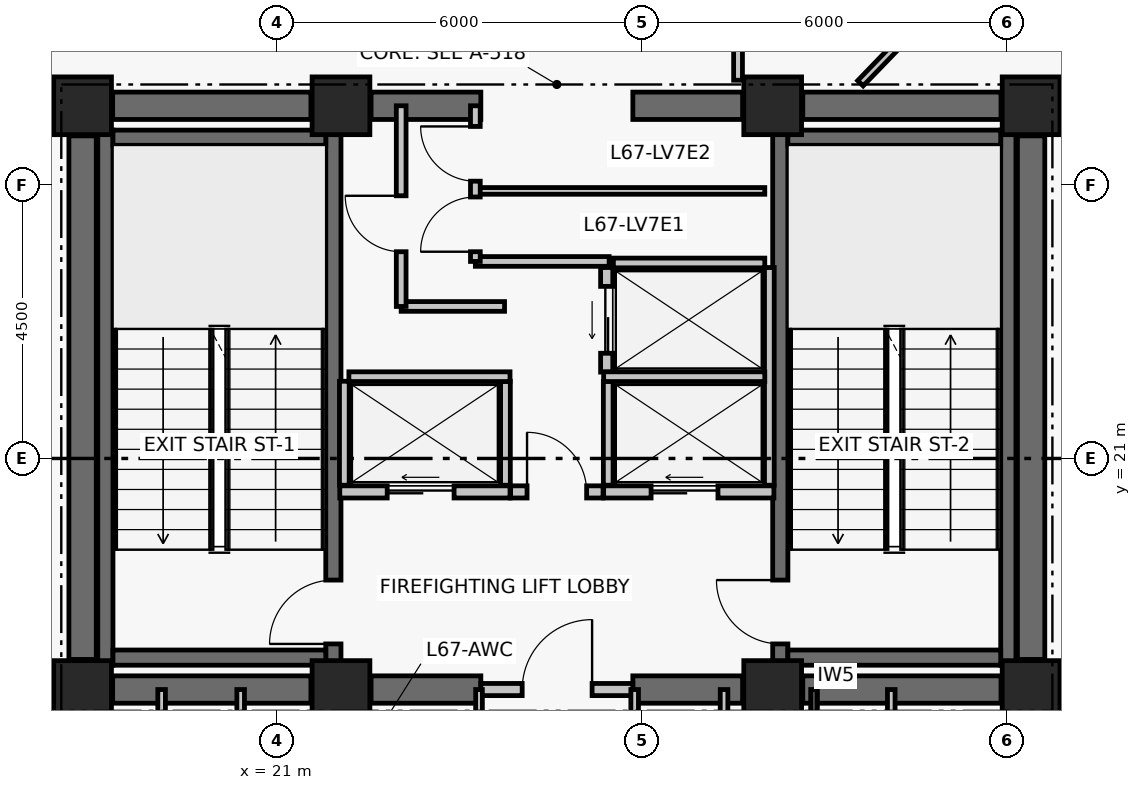
"""IFC4 building model, lengths in metres.
Left out: names, types, materials, properties, quantities, classifications, styles, units other than length and angle.
Written with IfcOpenShell. Run it as: python <this file> out.ifc"""

import sys

from ifc_helpers import new_model, si_unit, direction, frame, frame_2d, origin, origin_2d, place, context, subcontext, project, spatial, rectangle, extrude, element, fill, save


model = new_model("IFC4")
c1 = context("Model", 3, precision=1e-05, world=origin(), true_north=direction((0.0, 1.0)))
c2 = subcontext(c1, "Body", "Model", "MODEL_VIEW")
j1 = project(units=[si_unit("LENGTHUNIT", "METRE"), si_unit("PLANEANGLEUNIT", "RADIAN")], contexts=[c1])
p1 = place(None, origin())
s1 = spatial("IfcSite", under=j1, at=p1, CompositionType="ELEMENT")
p2 = place(p1, origin())
s2 = spatial("IfcBuilding", under=s1, at=p2, CompositionType="ELEMENT")
p3 = place(p2, frame((0.0, 0.0, 265.74)))
s3 = spatial("IfcBuildingStorey", under=s2, at=p3, CompositionType="ELEMENT", Elevation=265.74)
for number, where, z_axis, x_axis in (
    (1, (17.8, 17.2, 0.0), (0.0, 0.0, 1.0), (1.0, 0.0, 0.0)),
    (2, (22.05, 17.2, 0.0), (0.0, 0.0, 1.0), (1.0, 0.0, 0.0)),
    (3, (29.15, 17.2, 0.0), (0.0, 0.0, 1.0), (1.0, 0.0, 0.0)),
    (4, (33.4, 17.2, 0.0), (0.0, 0.0, 1.0), (1.0, 0.0, 0.0)),
    (5, (17.8, 26.8, 0.0), (0.0, 0.0, 1.0), (1.0, 0.0, 0.0)),
    (6, (22.05, 26.8, 0.0), (0.0, 0.0, 1.0), (1.0, 0.0, 0.0)),
    (7, (29.15, 26.8, 0.0), (0.0, 0.0, 1.0), (1.0, 0.0, 0.0)),
    (8, (33.4, 26.8, 0.0), (0.0, 0.0, 1.0), (1.0, 0.0, 0.0)),
):
    element("IfcColumn", number, at=place(p3, frame(where, z_axis=z_axis, x_axis=x_axis)), inside=s3, PredefinedType="COLUMN", context=c2, shape_type="SweptSolid", body=[
        extrude(rectangle(XDim=0.95, YDim=0.95, at=origin_2d()), origin(), (0.0, 0.0, 1.0), 3.72),
    ])
p4 = place(p3, frame((18.295, 17.2, 0.0), z_axis=(0.0, 0.0, 1.0), x_axis=(1.0, 0.0, 0.0)))
e9 = element("IfcWall", 9, at=p4, inside=s3, PredefinedType="SHEAR", context=c2, shape_type="SweptSolid", body=[
    extrude(rectangle(XDim=3.26, YDim=0.45, at=frame_2d((1.63, 0.0))), origin(), (0.0, 0.0, 1.0), 3.5),
])
p5 = place(p3, frame((22.545, 17.2, 0.0), z_axis=(0.0, 0.0, 1.0), x_axis=(1.0, 0.0, 0.0)))
e10 = element("IfcWall", 10, at=p5, inside=s3, PredefinedType="SHEAR", context=c2, shape_type="SweptSolid", body=[
    extrude(rectangle(XDim=1.805, YDim=0.45, at=frame_2d((0.903, 0.0))), origin(), (0.0, 0.0, 1.0), 3.5),
])
p6 = place(p3, frame((26.85, 17.2, 0.0), z_axis=(0.0, 0.0, 1.0), x_axis=(1.0, 0.0, 0.0)))
e11 = element("IfcWall", 11, at=p6, inside=s3, PredefinedType="SHEAR", context=c2, shape_type="SweptSolid", body=[
    extrude(rectangle(XDim=1.805, YDim=0.45, at=frame_2d((0.902, 0.0))), origin(), (0.0, 0.0, 1.0), 3.5),
])
for number, where, z_axis, x_axis in (
    (12, (29.645, 17.2, 0.0), (0.0, 0.0, 1.0), (1.0, 0.0, 0.0)),
    (13, (18.295, 26.8, 0.0), (0.0, 0.0, 1.0), (1.0, 0.0, 0.0)),
):
    element("IfcWall", number, at=place(p3, frame(where, z_axis=z_axis, x_axis=x_axis)), inside=s3, PredefinedType="SHEAR", context=c2, shape_type="SweptSolid", body=[
        extrude(rectangle(XDim=3.26, YDim=0.45, at=frame_2d((1.63, 0.0))), origin(), (0.0, 0.0, 1.0), 3.5),
    ])
p7 = place(p3, frame((22.545, 26.8, 0.0), z_axis=(0.0, 0.0, 1.0), x_axis=(1.0, 0.0, 0.0)))
e14 = element("IfcWall", 14, at=p7, inside=s3, PredefinedType="SHEAR", context=c2, shape_type="SweptSolid", body=[
    extrude(rectangle(XDim=1.805, YDim=0.45, at=frame_2d((0.903, 0.0))), origin(), (0.0, 0.0, 1.0), 3.5),
])
p8 = place(p3, frame((26.85, 26.8, 0.0), z_axis=(0.0, 0.0, 1.0), x_axis=(1.0, 0.0, 0.0)))
e15 = element("IfcWall", 15, at=p8, inside=s3, PredefinedType="SHEAR", context=c2, shape_type="SweptSolid", body=[
    extrude(rectangle(XDim=1.805, YDim=0.45, at=frame_2d((0.902, 0.0))), origin(), (0.0, 0.0, 1.0), 3.5),
])
p9 = place(p3, frame((29.645, 26.8, 0.0), z_axis=(0.0, 0.0, 1.0), x_axis=(1.0, 0.0, 0.0)))
e16 = element("IfcWall", 16, at=p9, inside=s3, PredefinedType="SHEAR", context=c2, shape_type="SweptSolid", body=[
    extrude(rectangle(XDim=3.26, YDim=0.45, at=frame_2d((1.63, 0.0))), origin(), (0.0, 0.0, 1.0), 3.5),
])
for number, where, z_axis, x_axis in (
    (17, (17.8, 17.695, 0.0), (0.0, 0.0, 1.0), (0.0, 1.0, 0.0)),
    (18, (33.4, 17.695, 0.0), (0.0, 0.0, 1.0), (0.0, 1.0, 0.0)),
):
    element("IfcWall", number, at=place(p3, frame(where, z_axis=z_axis, x_axis=x_axis)), inside=s3, PredefinedType="SHEAR", context=c2, shape_type="SweptSolid", body=[
        extrude(rectangle(XDim=8.61, YDim=0.45, at=frame_2d((4.305, 0.0))), origin(), (0.0, 0.0, 1.0), 3.5),
    ])
p10 = place(p3, frame((18.175, 17.6, 0.0), z_axis=(0.0, 0.0, 1.0), x_axis=(0.0, 1.0, 0.0)))
e19 = element("IfcWall", 19, at=p10, inside=s3, PredefinedType="SHEAR", context=c2, shape_type="SweptSolid", body=[
    extrude(rectangle(XDim=8.8, YDim=0.25, at=frame_2d((4.4, 0.0))), origin(), (0.0, 0.0, 1.0), 3.5),
])
p11 = place(p3, frame((21.925, 17.6, 0.0), z_axis=(0.0, 0.0, 1.0), x_axis=(0.0, 1.0, 0.0)))
e20 = element("IfcWall", 20, at=p11, inside=s3, PredefinedType="SHEAR", context=c2, shape_type="SweptSolid", body=[
    extrude(rectangle(XDim=8.8, YDim=0.25, at=frame_2d((4.4, 0.0))), origin(), (0.0, 0.0, 1.0), 3.5),
])
p12 = place(p11, frame((0.35, 0.0, 0.0)))
e21 = element("IfcOpeningElement", 21, at=p12, cuts=e20, PredefinedType="OPENING", context=c2, shape_type="SweptSolid", body=[
    extrude(rectangle(XDim=1.05, YDim=2.08, at=frame_2d((0.525, 1.04))), frame((0.0, 0.135, 0.0), z_axis=(0.0, -1.0, 0.0), x_axis=(1.0, 0.0, 0.0)), (0.0, 0.0, 1.0), 0.27),
])
for number, where, z_axis, x_axis in (
    (22, (18.3, 17.725, 0.0), (0.0, 0.0, 1.0), (1.0, 0.0, 0.0)),
    (23, (18.3, 26.275, 0.0), (0.0, 0.0, 1.0), (1.0, 0.0, 0.0)),
):
    element("IfcWall", number, at=place(p3, frame(where, z_axis=z_axis, x_axis=x_axis)), inside=s3, PredefinedType="SHEAR", context=c2, shape_type="SweptSolid", body=[
        extrude(rectangle(XDim=3.5, YDim=0.25, at=frame_2d((1.75, 0.0))), origin(), (0.0, 0.0, 1.0), 3.5),
    ])
p13 = place(p3, frame((29.275, 17.6, 0.0), z_axis=(0.0, 0.0, 1.0), x_axis=(0.0, 1.0, 0.0)))
e24 = element("IfcWall", 24, at=p13, inside=s3, PredefinedType="SHEAR", context=c2, shape_type="SweptSolid", body=[
    extrude(rectangle(XDim=8.8, YDim=0.25, at=frame_2d((4.4, 0.0))), origin(), (0.0, 0.0, 1.0), 3.5),
])
p14 = place(p13, frame((0.35, 0.0, 0.0)))
e25 = element("IfcOpeningElement", 25, at=p14, cuts=e24, PredefinedType="OPENING", context=c2, shape_type="SweptSolid", body=[
    extrude(rectangle(XDim=1.05, YDim=2.08, at=frame_2d((0.525, 1.04))), frame((0.0, 0.135, 0.0), z_axis=(0.0, -1.0, 0.0), x_axis=(1.0, 0.0, 0.0)), (0.0, 0.0, 1.0), 0.27),
])
p15 = place(p3, frame((33.025, 17.6, 0.0), z_axis=(0.0, 0.0, 1.0), x_axis=(0.0, 1.0, 0.0)))
e26 = element("IfcWall", 26, at=p15, inside=s3, PredefinedType="SHEAR", context=c2, shape_type="SweptSolid", body=[
    extrude(rectangle(XDim=8.8, YDim=0.25, at=frame_2d((4.4, 0.0))), origin(), (0.0, 0.0, 1.0), 3.5),
])
for number, where, z_axis, x_axis in (
    (27, (29.4, 17.725, 0.0), (0.0, 0.0, 1.0), (1.0, 0.0, 0.0)),
    (28, (29.4, 26.275, 0.0), (0.0, 0.0, 1.0), (1.0, 0.0, 0.0)),
):
    element("IfcWall", number, at=place(p3, frame(where, z_axis=z_axis, x_axis=x_axis)), inside=s3, PredefinedType="SHEAR", context=c2, shape_type="SweptSolid", body=[
        extrude(rectangle(XDim=3.5, YDim=0.25, at=frame_2d((1.75, 0.0))), origin(), (0.0, 0.0, 1.0), 3.5),
    ])
p16 = place(p3, frame((24.35, 17.2, 0.0), z_axis=(0.0, 0.0, 1.0), x_axis=(1.0, 0.0, 0.0)))
e29 = element("IfcWall", 29, at=p16, inside=s3, PredefinedType="PARTITIONING", context=c2, shape_type="SweptSolid", body=[
    extrude(rectangle(XDim=2.5, YDim=0.2, at=frame_2d((1.25, 0.0))), origin(), (0.0, 0.0, 1.0), 2.63),
])
p17 = place(p16, frame((0.68, 0.0, 0.0)))
e30 = element("IfcOpeningElement", 30, at=p17, cuts=e29, PredefinedType="OPENING", context=c2, shape_type="SweptSolid", body=[
    extrude(rectangle(XDim=1.15, YDim=2.08, at=frame_2d((0.575, 1.04))), frame((0.0, 0.11, 0.0), z_axis=(0.0, -1.0, 0.0), x_axis=(1.0, 0.0, 0.0)), (0.0, 0.0, 1.0), 0.22),
])
p18 = place(p3, frame((24.84, 20.45, 0.0), z_axis=(0.0, 0.0, 1.0), x_axis=(1.0, 0.0, 0.0)))
e31 = element("IfcWall", 31, at=p18, inside=s3, PredefinedType="PARTITIONING", context=c2, shape_type="SweptSolid", body=[
    extrude(rectangle(XDim=1.52, YDim=0.2, at=frame_2d((0.76, 0.0))), origin(), (0.0, 0.0, 1.0), 3.5),
])
p19 = place(p18, frame((0.27, 0.0, 0.0)))
e32 = element("IfcOpeningElement", 32, at=p19, cuts=e31, PredefinedType="OPENING", context=c2, shape_type="SweptSolid", body=[
    extrude(rectangle(XDim=0.98, YDim=2.06, at=frame_2d((0.49, 1.03))), frame((0.0, 0.11, 0.0), z_axis=(0.0, -1.0, 0.0), x_axis=(1.0, 0.0, 0.0)), (0.0, 0.0, 1.0), 0.22),
])
p20 = place(p3, frame((22.03, 20.45, 0.0), z_axis=(0.0, 0.0, 1.0), x_axis=(1.0, 0.0, 0.0)))
e33 = element("IfcWall", 33, at=p20, inside=s3, PredefinedType="PARTITIONING", context=c2, shape_type="SweptSolid", body=[
    extrude(rectangle(XDim=2.8, YDim=0.2, at=frame_2d((1.4, 0.0))), origin(), (0.0, 0.0, 1.0), 3.5),
])
p21 = place(p20, frame((0.78, 0.0, 0.0)))
e34 = element("IfcOpeningElement", 34, at=p21, cuts=e33, PredefinedType="OPENING", context=c2, shape_type="SweptSolid", body=[
    extrude(rectangle(XDim=1.1, YDim=2.08, at=frame_2d((0.55, 1.04))), frame((0.0, 0.11, 0.0), z_axis=(0.0, -1.0, 0.0), x_axis=(1.0, 0.0, 0.0)), (0.0, 0.0, 1.0), 0.22),
])
p22 = place(p3, frame((26.37, 20.45, 0.0), z_axis=(0.0, 0.0, 1.0), x_axis=(1.0, 0.0, 0.0)))
e35 = element("IfcWall", 35, at=p22, inside=s3, PredefinedType="PARTITIONING", context=c2, shape_type="SweptSolid", body=[
    extrude(rectangle(XDim=2.8, YDim=0.2, at=frame_2d((1.4, 0.0))), origin(), (0.0, 0.0, 1.0), 3.5),
])
p23 = place(p22, frame((0.78, 0.0, 0.0)))
e36 = element("IfcOpeningElement", 36, at=p23, cuts=e35, PredefinedType="OPENING", context=c2, shape_type="SweptSolid", body=[
    extrude(rectangle(XDim=1.1, YDim=2.08, at=frame_2d((0.55, 1.04))), frame((0.0, 0.11, 0.0), z_axis=(0.0, -1.0, 0.0), x_axis=(1.0, 0.0, 0.0)), (0.0, 0.0, 1.0), 0.22),
])
p24 = place(p3, frame((26.42, 22.42, 0.0), z_axis=(0.0, 0.0, 1.0), x_axis=(0.0, 1.0, 0.0)))
e37 = element("IfcWall", 37, at=p24, inside=s3, PredefinedType="PARTITIONING", context=c2, shape_type="SweptSolid", body=[
    extrude(rectangle(XDim=1.72, YDim=0.2, at=frame_2d((0.86, 0.0))), origin(), (0.0, 0.0, 1.0), 3.5),
])
p25 = place(p24, frame((0.31, 0.0, 0.0)))
e38 = element("IfcOpeningElement", 38, at=p25, cuts=e37, PredefinedType="OPENING", context=c2, shape_type="SweptSolid", body=[
    extrude(rectangle(XDim=1.1, YDim=2.08, at=frame_2d((0.55, 1.04))), frame((0.0, 0.11, 0.0), z_axis=(0.0, -1.0, 0.0), x_axis=(1.0, 0.0, 0.0)), (0.0, 0.0, 1.0), 0.22),
])
for number, where, z_axis, x_axis in (
    (39, (22.105, 20.56, 0.0), (0.0, 0.0, 1.0), (0.0, 1.0, 0.0)),
    (40, (24.755, 20.56, 0.0), (0.0, 0.0, 1.0), (0.0, 1.0, 0.0)),
):
    element("IfcWall", number, at=place(p3, frame(where, z_axis=z_axis, x_axis=x_axis)), inside=s3, PredefinedType="PARTITIONING", context=c2, shape_type="SweptSolid", body=[
        extrude(rectangle(XDim=1.71, YDim=0.16, at=frame_2d((0.855, 0.0))), origin(), (0.0, 0.0, 1.0), 3.5),
    ])
p26 = place(p3, frame((22.18, 22.345, 0.0), z_axis=(0.0, 0.0, 1.0), x_axis=(1.0, 0.0, 0.0)))
e41 = element("IfcWall", 41, at=p26, inside=s3, PredefinedType="PARTITIONING", context=c2, shape_type="SweptSolid", body=[
    extrude(rectangle(XDim=2.65, YDim=0.16, at=frame_2d((1.325, 0.0))), origin(), (0.0, 0.0, 1.0), 3.5),
])
p27 = place(p3, frame((29.095, 20.56, 0.0), z_axis=(0.0, 0.0, 1.0), x_axis=(0.0, 1.0, 0.0)))
e42 = element("IfcWall", 42, at=p27, inside=s3, PredefinedType="PARTITIONING", context=c2, shape_type="SweptSolid", body=[
    extrude(rectangle(XDim=3.58, YDim=0.16, at=frame_2d((1.79, 0.0))), origin(), (0.0, 0.0, 1.0), 3.5),
])
p28 = place(p3, frame((26.445, 20.56, 0.0), z_axis=(0.0, 0.0, 1.0), x_axis=(0.0, 1.0, 0.0)))
e43 = element("IfcWall", 43, at=p28, inside=s3, PredefinedType="PARTITIONING", context=c2, shape_type="SweptSolid", body=[
    extrude(rectangle(XDim=1.71, YDim=0.16, at=frame_2d((0.855, 0.0))), origin(), (0.0, 0.0, 1.0), 3.5),
])
p29 = place(p3, frame((26.37, 22.345, 0.0), z_axis=(0.0, 0.0, 1.0), x_axis=(1.0, 0.0, 0.0)))
e44 = element("IfcWall", 44, at=p29, inside=s3, PredefinedType="PARTITIONING", context=c2, shape_type="SweptSolid", body=[
    extrude(rectangle(XDim=2.65, YDim=0.16, at=frame_2d((1.325, 0.0))), origin(), (0.0, 0.0, 1.0), 3.5),
])
p30 = place(p3, frame((26.53, 24.215, 0.0), z_axis=(0.0, 0.0, 1.0), x_axis=(1.0, 0.0, 0.0)))
e45 = element("IfcWall", 45, at=p30, inside=s3, PredefinedType="PARTITIONING", context=c2, shape_type="SweptSolid", body=[
    extrude(rectangle(XDim=2.49, YDim=0.16, at=frame_2d((1.245, 0.0))), origin(), (0.0, 0.0, 1.0), 3.5),
])
p31 = place(p3, frame((23.04, 23.5, 0.0), z_axis=(0.0, 0.0, 1.0), x_axis=(1.0, 0.0, 0.0)))
e46 = element("IfcWall", 46, at=p31, inside=s3, PredefinedType="PARTITIONING", context=c2, shape_type="SweptSolid", body=[
    extrude(rectangle(XDim=1.7, YDim=0.16, at=frame_2d((0.85, 0.0))), origin(), (0.0, 0.0, 1.0), 3.5),
])
p32 = place(p3, frame((23.04, 23.5, 0.0), z_axis=(0.0, 0.0, 1.0), x_axis=(0.0, 1.0, 0.0)))
e47 = element("IfcWall", 47, at=p32, inside=s3, PredefinedType="PARTITIONING", context=c2, shape_type="SweptSolid", body=[
    extrude(rectangle(XDim=3.3, YDim=0.16, at=frame_2d((1.65, 0.0))), origin(), (0.0, 0.0, 1.0), 2.63),
])
p33 = place(p32, frame((0.9, 0.0, 0.0)))
e48 = element("IfcOpeningElement", 48, at=p33, cuts=e47, PredefinedType="OPENING", context=c2, shape_type="SweptSolid", body=[
    extrude(rectangle(XDim=0.92, YDim=2.05, at=frame_2d((0.46, 1.025))), frame((0.0, 0.09, 0.0), z_axis=(0.0, -1.0, 0.0), x_axis=(1.0, 0.0, 0.0)), (0.0, 0.0, 1.0), 0.18),
])
p34 = place(p3, frame((24.26, 24.24, 0.0), z_axis=(0.0, 0.0, 1.0), x_axis=(1.0, 0.0, 0.0)))
e49 = element("IfcWall", 49, at=p34, inside=s3, PredefinedType="PARTITIONING", context=c2, shape_type="SweptSolid", body=[
    extrude(rectangle(XDim=2.2, YDim=0.16, at=frame_2d((1.1, 0.0))), origin(), (0.0, 0.0, 1.0), 3.5),
])
p35 = place(p3, frame((24.26, 25.4, 0.0), z_axis=(0.0, 0.0, 1.0), x_axis=(1.0, 0.0, 0.0)))
e50 = element("IfcWall", 50, at=p35, inside=s3, PredefinedType="PARTITIONING", context=c2, shape_type="SweptSolid", body=[
    extrude(rectangle(XDim=4.76, YDim=0.11, at=frame_2d((2.38, 0.0))), origin(), (0.0, 0.0, 1.0), 3.5),
])
p36 = place(p3, frame((24.26, 24.24, 0.0), z_axis=(0.0, 0.0, 1.0), x_axis=(0.0, 1.0, 0.0)))
e51 = element("IfcWall", 51, at=p36, inside=s3, PredefinedType="PARTITIONING", context=c2, shape_type="SweptSolid", body=[
    extrude(rectangle(XDim=2.56, YDim=0.16, at=frame_2d((1.28, 0.0))), origin(), (0.0, 0.0, 1.0), 2.63),
])
p37 = place(p36, frame((0.16, 0.0, 0.0)))
e52 = element("IfcOpeningElement", 52, at=p37, cuts=e51, PredefinedType="OPENING", context=c2, shape_type="SweptSolid", body=[
    extrude(rectangle(XDim=0.9, YDim=2.02, at=frame_2d((0.45, 1.01))), frame((0.0, 0.09, 0.0), z_axis=(0.0, -1.0, 0.0), x_axis=(1.0, 0.0, 0.0)), (0.0, 0.0, 1.0), 0.18),
])
p38 = place(p36, frame((1.32, 0.0, 0.0)))
e53 = element("IfcOpeningElement", 53, at=p38, cuts=e51, PredefinedType="OPENING", context=c2, shape_type="SweptSolid", body=[
    extrude(rectangle(XDim=0.9, YDim=2.02, at=frame_2d((0.45, 1.01))), frame((0.0, 0.09, 0.0), z_axis=(0.0, -1.0, 0.0), x_axis=(1.0, 0.0, 0.0)), (0.0, 0.0, 1.0), 0.18),
])
for number, where, z_axis, x_axis in (
    (54, (19.1, 14.95, 0.0), (0.0, 0.0, 1.0), (0.0, 1.0, 0.0)),
    (55, (20.4, 14.95, 0.0), (0.0, 0.0, 1.0), (0.0, 1.0, 0.0)),
):
    element("IfcWall", number, at=place(p3, frame(where, z_axis=z_axis, x_axis=x_axis)), inside=s3, PredefinedType="PARTITIONING", context=c2, shape_type="SweptSolid", body=[
        extrude(rectangle(XDim=2.25, YDim=0.125, at=frame_2d((1.125, 0.0))), origin(), (0.0, 0.0, 1.0), 2.63),
    ])
p39 = place(p3, frame((24.32, 14.95, 0.0), z_axis=(0.0, 0.0, 1.0), x_axis=(0.0, 1.0, 0.0)))
e56 = element("IfcWall", 56, at=p39, inside=s3, PredefinedType="PARTITIONING", context=c2, shape_type="SweptSolid", body=[
    extrude(rectangle(XDim=2.25, YDim=0.11, at=frame_2d((1.125, 0.0))), origin(), (0.0, 0.0, 1.0), 2.63),
])
for number, where, z_axis, x_axis in (
    (57, (26.88, 14.95, 0.0), (0.0, 0.0, 1.0), (0.0, 1.0, 0.0)),
    (58, (28.35, 14.95, 0.0), (0.0, 0.0, 1.0), (0.0, 1.0, 0.0)),
):
    element("IfcWall", number, at=place(p3, frame(where, z_axis=z_axis, x_axis=x_axis)), inside=s3, PredefinedType="PARTITIONING", context=c2, shape_type="SweptSolid", body=[
        extrude(rectangle(XDim=2.25, YDim=0.125, at=frame_2d((1.125, 0.0))), origin(), (0.0, 0.0, 1.0), 2.63),
    ])
p40 = place(p3, frame((29.83, 14.95, 0.0), z_axis=(0.0, 0.0, 1.0), x_axis=(0.0, 1.0, 0.0)))
e59 = element("IfcWall", 59, at=p40, inside=s3, PredefinedType="PARTITIONING", context=c2, shape_type="SweptSolid", body=[
    extrude(rectangle(XDim=2.25, YDim=0.11, at=frame_2d((1.125, 0.0))), origin(), (0.0, 0.0, 1.0), 2.63),
])
p41 = place(p3, frame((31.1, 14.95, 0.0), z_axis=(0.0, 0.0, 1.0), x_axis=(0.0, 1.0, 0.0)))
e60 = element("IfcWall", 60, at=p41, inside=s3, PredefinedType="PARTITIONING", context=c2, shape_type="SweptSolid", body=[
    extrude(rectangle(XDim=2.25, YDim=0.125, at=frame_2d((1.125, 0.0))), origin(), (0.0, 0.0, 1.0), 2.63),
])
p42 = place(p3, frame((28.58, 27.22, 0.0), z_axis=(0.0, 0.0, 1.0), x_axis=(0.0, 1.0, 0.0)))
e61 = element("IfcWall", 61, at=p42, inside=s3, PredefinedType="PARTITIONING", context=c2, shape_type="SweptSolid", body=[
    extrude(rectangle(XDim=1.48, YDim=0.145, at=frame_2d((0.74, 0.0))), origin(), (0.0, 0.0, 1.0), 2.63),
])
p43 = place(p3, frame((30.593, 27.17, 0.0), z_axis=(0.0, 0.0, 1.0), x_axis=(0.694647663232, 0.719350140033, 0.0)))
e62 = element("IfcWall", 62, at=p43, inside=s3, PredefinedType="PARTITIONING", context=c2, shape_type="SweptSolid", body=[
    extrude(rectangle(XDim=2.787, YDim=0.125, at=frame_2d((1.394, 0.0))), origin(), (0.0, 0.0, 1.0), 2.63),
])
p44 = place(p12, origin())
e63 = element("IfcDoor", 63, at=p44, inside=s3, OperationType="SINGLE_SWING_LEFT", PredefinedType="DOOR", context=c2, shape_type="SweptSolid", body=[
    extrude(rectangle(XDim=1.05, YDim=2.08, at=frame_2d((0.525, 1.04))), frame((0.0, 0.025, 0.0), z_axis=(0.0, -1.0, 0.0), x_axis=(1.0, 0.0, 0.0)), (0.0, 0.0, 1.0), 0.05),
])
fill(e21, e63)
p45 = place(p14, origin())
e64 = element("IfcDoor", 64, at=p45, inside=s3, OperationType="SINGLE_SWING_RIGHT", PredefinedType="DOOR", context=c2, shape_type="SweptSolid", body=[
    extrude(rectangle(XDim=1.05, YDim=2.08, at=frame_2d((0.525, 1.04))), frame((0.0, 0.025, 0.0), z_axis=(0.0, -1.0, 0.0), x_axis=(1.0, 0.0, 0.0)), (0.0, 0.0, 1.0), 0.05),
])
fill(e25, e64)
p46 = place(p17, origin())
e65 = element("IfcDoor", 65, at=p46, inside=s3, OperationType="SINGLE_SWING_RIGHT", PredefinedType="DOOR", context=c2, shape_type="SweptSolid", body=[
    extrude(rectangle(XDim=1.15, YDim=2.08, at=frame_2d((0.575, 1.04))), frame((0.0, 0.025, 0.0), z_axis=(0.0, -1.0, 0.0), x_axis=(1.0, 0.0, 0.0)), (0.0, 0.0, 1.0), 0.05),
])
fill(e30, e65)
p47 = place(p19, origin())
e66 = element("IfcDoor", 66, at=p47, inside=s3, OperationType="SINGLE_SWING_LEFT", PredefinedType="DOOR", context=c2, shape_type="SweptSolid", body=[
    extrude(rectangle(XDim=0.98, YDim=2.06, at=frame_2d((0.49, 1.03))), frame((0.0, 0.025, 0.0), z_axis=(0.0, -1.0, 0.0), x_axis=(1.0, 0.0, 0.0)), (0.0, 0.0, 1.0), 0.05),
])
fill(e32, e66)
p48 = place(p21, origin())
e67 = element("IfcDoor", 67, at=p48, inside=s3, OperationType="DOUBLE_DOOR_SLIDING", PredefinedType="DOOR", context=c2, shape_type="SweptSolid", body=[
    extrude(rectangle(XDim=1.1, YDim=2.08, at=frame_2d((0.55, 1.04))), frame((0.0, 0.025, 0.0), z_axis=(0.0, -1.0, 0.0), x_axis=(1.0, 0.0, 0.0)), (0.0, 0.0, 1.0), 0.05),
])
fill(e34, e67)
p49 = place(p23, origin())
e68 = element("IfcDoor", 68, at=p49, inside=s3, OperationType="DOUBLE_DOOR_SLIDING", PredefinedType="DOOR", context=c2, shape_type="SweptSolid", body=[
    extrude(rectangle(XDim=1.1, YDim=2.08, at=frame_2d((0.55, 1.04))), frame((0.0, 0.025, 0.0), z_axis=(0.0, -1.0, 0.0), x_axis=(1.0, 0.0, 0.0)), (0.0, 0.0, 1.0), 0.05),
])
fill(e36, e68)
p50 = place(p25, origin())
e69 = element("IfcDoor", 69, at=p50, inside=s3, OperationType="DOUBLE_DOOR_SLIDING", PredefinedType="DOOR", context=c2, shape_type="SweptSolid", body=[
    extrude(rectangle(XDim=1.1, YDim=2.08, at=frame_2d((0.55, 1.04))), frame((0.0, 0.025, 0.0), z_axis=(0.0, -1.0, 0.0), x_axis=(1.0, 0.0, 0.0)), (0.0, 0.0, 1.0), 0.05),
])
fill(e38, e69)
p51 = place(p33, origin())
e70 = element("IfcDoor", 70, at=p51, inside=s3, OperationType="SINGLE_SWING_RIGHT", PredefinedType="DOOR", context=c2, shape_type="SweptSolid", body=[
    extrude(rectangle(XDim=0.92, YDim=2.05, at=frame_2d((0.46, 1.025))), frame((0.0, 0.025, 0.0), z_axis=(0.0, -1.0, 0.0), x_axis=(1.0, 0.0, 0.0)), (0.0, 0.0, 1.0), 0.05),
])
fill(e48, e70)
p52 = place(p37, origin())
e71 = element("IfcDoor", 71, at=p52, inside=s3, OperationType="SINGLE_SWING_LEFT", PredefinedType="DOOR", context=c2, shape_type="SweptSolid", body=[
    extrude(rectangle(XDim=0.9, YDim=2.02, at=frame_2d((0.45, 1.01))), frame((0.0, 0.025, 0.0), z_axis=(0.0, -1.0, 0.0), x_axis=(1.0, 0.0, 0.0)), (0.0, 0.0, 1.0), 0.05),
])
fill(e52, e71)
p53 = place(p38, origin())
e72 = element("IfcDoor", 72, at=p53, inside=s3, OperationType="SINGLE_SWING_RIGHT", PredefinedType="DOOR", context=c2, shape_type="SweptSolid", body=[
    extrude(rectangle(XDim=0.9, YDim=2.02, at=frame_2d((0.45, 1.01))), frame((0.0, 0.025, 0.0), z_axis=(0.0, -1.0, 0.0), x_axis=(1.0, 0.0, 0.0)), (0.0, 0.0, 1.0), 0.05),
])
fill(e53, e72)
save(model, sys.argv[1])
